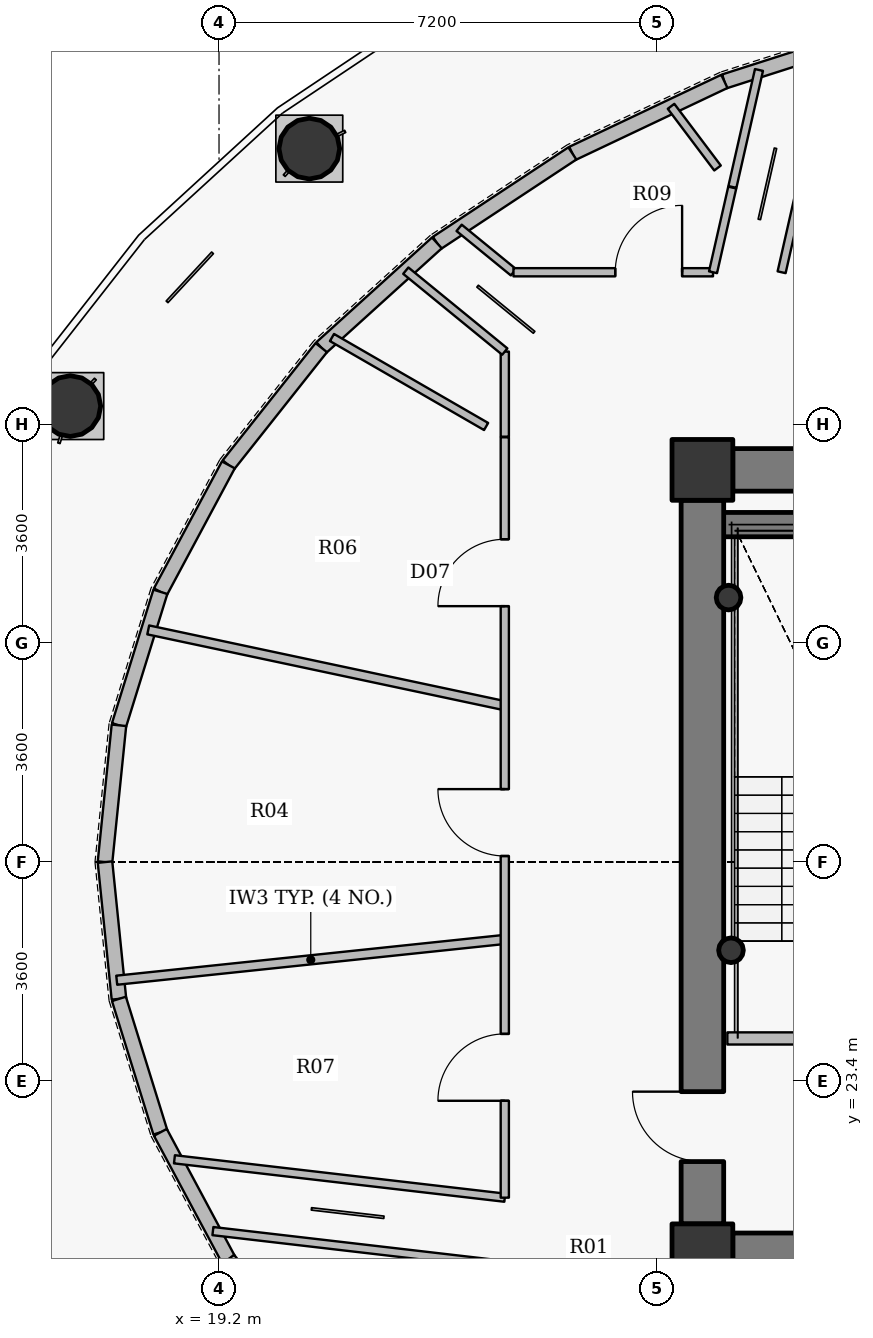
"""IFC4 building model, lengths in metres.
Left out: names, types, materials, properties, quantities, classifications, styles, units other than length and angle.
Written with IfcOpenShell. Run it as: python <this file> out.ifc"""

import sys

from ifc_helpers import new_model, si_unit, direction, frame, frame_2d, origin, origin_2d, place, context, subcontext, project, spatial, rectangle, hollow_circle, extrude, source, transform, mapped, element, fill, save


model = new_model("IFC4")
c1 = context("Model", 3, precision=1e-05, world=origin(), true_north=direction((0.0, 1.0)))
c2 = subcontext(c1, "Body", "Model", "MODEL_VIEW")
j1 = project(units=[si_unit("LENGTHUNIT", "METRE"), si_unit("PLANEANGLEUNIT", "RADIAN")], contexts=[c1])
p1 = place(None, origin())
s1 = spatial("IfcSite", under=j1, at=p1, CompositionType="ELEMENT")
p2 = place(p1, origin())
s2 = spatial("IfcBuilding", under=s1, at=p2, CompositionType="ELEMENT")
p3 = place(p2, frame((0.0, 0.0, 318.0)))
s3 = spatial("IfcBuildingStorey", under=s2, at=p3, CompositionType="ELEMENT", Elevation=318.0)
for number, where, z_axis, x_axis in (
    (1, (27.15, 20.55, 0.0), (0.0, 0.0, 1.0), (1.0, 0.0, 0.0)),
    (2, (27.15, 33.45, 0.0), (0.0, 0.0, 1.0), (1.0, 0.0, 0.0)),
):
    element("IfcColumn", number, at=place(p3, frame(where, z_axis=z_axis, x_axis=x_axis)), inside=s3, PredefinedType="COLUMN", context=c2, shape_type="SweptSolid", body=[
        extrude(rectangle(XDim=1.0, YDim=1.0, at=origin_2d()), origin(), (0.0, 0.0, 1.0), 6.0),
    ])
p4 = place(p3, frame((27.25, 32.55, 0.0), z_axis=(0.0, 0.0, 1.0), x_axis=(1.0, 0.0, 0.0)))
e3 = element("IfcWall", 3, at=p4, inside=s3, PredefinedType="SHEAR", context=c2, shape_type="SweptSolid", body=[
    extrude(rectangle(XDim=4.13, YDim=0.4, at=frame_2d((2.065, 0.0))), origin(), (0.0, 0.0, 1.0), 6.0),
])
for number, where, z_axis, x_axis in (
    (4, (27.58, 31.35, 0.0), (0.0, 0.0, 1.0), (1.0, 0.0, 0.0)),
    (5, (27.62, 25.55, 0.0), (0.0, 0.0, 1.0), (1.0, 0.0, 0.0)),
):
    element("IfcColumn", number, at=place(p3, frame(where, z_axis=z_axis, x_axis=x_axis)), inside=s3, PredefinedType="COLUMN", context=c2, shape_type="SweptSolid", body=[
        extrude(hollow_circle(Radius=0.203, WallThickness=0.016, at=origin_2d()), origin(), (0.0, 0.0, 1.0), 6.0),
    ])
p5 = place(p3, frame((27.65, 33.45, 0.0), z_axis=(0.0, 0.0, 1.0), x_axis=(1.0, 0.0, 0.0)))
e6 = element("IfcWall", 6, at=p5, inside=s3, PredefinedType="SHEAR", context=c2, shape_type="SweptSolid", body=[
    extrude(rectangle(XDim=16.7, YDim=0.7, at=frame_2d((8.35, 0.0))), origin(), (0.0, 0.0, 1.0), 5.3),
])
p6 = place(p5, frame((12.15, 0.0, 0.0)))
e7 = element("IfcOpeningElement", 7, at=p6, cuts=e6, PredefinedType="OPENING", context=c2, shape_type="SweptSolid", body=[
    extrude(rectangle(XDim=1.15, YDim=2.15, at=origin_2d()), frame((0.575, 0.36, 1.075), z_axis=(0.0, -1.0, 0.0), x_axis=(1.0, 0.0, 0.0)), (0.0, 0.0, 1.0), 0.72),
])
p7 = place(p3, frame((44.35, 20.55, 0.0), z_axis=(0.0, 0.0, 1.0), x_axis=(-1.0, 0.0, 0.0)))
e8 = element("IfcWall", 8, at=p7, inside=s3, PredefinedType="SHEAR", context=c2, shape_type="SweptSolid", body=[
    extrude(rectangle(XDim=16.7, YDim=0.7, at=frame_2d((8.35, 0.0))), origin(), (0.0, 0.0, 1.0), 5.3),
])
p8 = place(p7, frame((12.3, 0.0, 0.0)))
e9 = element("IfcOpeningElement", 9, at=p8, cuts=e8, PredefinedType="OPENING", context=c2, shape_type="SweptSolid", body=[
    extrude(rectangle(XDim=1.15, YDim=2.15, at=origin_2d()), frame((0.575, 0.36, 1.075), z_axis=(0.0, -1.0, 0.0), x_axis=(1.0, 0.0, 0.0)), (0.0, 0.0, 1.0), 0.72),
])
p9 = place(p3, frame((27.15, 21.05, 0.0), z_axis=(0.0, 0.0, 1.0), x_axis=(0.0, 1.0, 0.0)))
e10 = element("IfcWall", 10, at=p9, inside=s3, PredefinedType="SHEAR", context=c2, shape_type="SweptSolid", body=[
    extrude(rectangle(XDim=11.9, YDim=0.7, at=frame_2d((5.95, 0.0))), origin(), (0.0, 0.0, 1.0), 5.3),
])
p10 = place(p9, frame((1.025, 0.0, 0.0)))
e11 = element("IfcOpeningElement", 11, at=p10, cuts=e10, PredefinedType="OPENING", context=c2, shape_type="SweptSolid", body=[
    extrude(rectangle(XDim=1.15, YDim=2.15, at=origin_2d()), frame((0.575, 0.36, 1.075), z_axis=(0.0, -1.0, 0.0), x_axis=(1.0, 0.0, 0.0)), (0.0, 0.0, 1.0), 0.72),
])
for number, where, z_axis, x_axis in (
    (12, (20.685, 38.733, 0.0), (0.0, 0.0, 1.0), (1.0, 0.0, 0.0)),
    (13, (16.754, 34.5, 0.0), (0.0, 0.0, 1.0), (1.0, 0.0, 0.0)),
):
    element("IfcColumn", number, at=place(p3, frame(where, z_axis=z_axis, x_axis=x_axis)), inside=s3, PredefinedType="COLUMN", context=c2, shape_type="SweptSolid", body=[
        extrude(hollow_circle(Radius=0.5, WallThickness=0.032, at=origin_2d()), origin(), (0.0, 0.0, 1.0), 5.75),
    ])
p11 = place(p3, frame((27.511, 39.839, 0.0), z_axis=(0.0, 0.0, 1.0), x_axis=(0.952332464146, 0.305062088326, 0.0)))
e14 = element("IfcWall", 14, at=p11, inside=s3, PredefinedType="SOLIDWALL", context=c2, shape_type="SweptSolid", body=[
    extrude(rectangle(XDim=2.846, YDim=0.24, at=frame_2d((1.423, 0.0))), origin(), (0.0, 0.0, 1.0), 2.832),
])
p12 = place(p3, frame((25.011, 38.654, 0.0), z_axis=(0.0, 0.0, 1.0), x_axis=(0.903637179904, 0.428298782505, 0.0)))
e15 = element("IfcWall", 15, at=p12, inside=s3, PredefinedType="SOLIDWALL", context=c2, shape_type="SweptSolid", body=[
    extrude(rectangle(XDim=2.766, YDim=0.24, at=frame_2d((1.383, 0.0))), origin(), (0.0, 0.0, 1.0), 5.75),
])
p13 = place(p3, frame((22.783, 37.182, 0.0), z_axis=(0.0, 0.0, 1.0), x_axis=(0.834405901953, 0.551150424827, 0.0)))
e16 = element("IfcWall", 16, at=p13, inside=s3, PredefinedType="SOLIDWALL", context=c2, shape_type="SweptSolid", body=[
    extrude(rectangle(XDim=2.67, YDim=0.24, at=frame_2d((1.335, 0.0))), origin(), (0.0, 0.0, 1.0), 2.832),
])
p14 = place(p3, frame((20.882, 35.461, 0.0), z_axis=(0.0, 0.0, 1.0), x_axis=(0.741265131079, 0.671212340058, 0.0)))
e17 = element("IfcWall", 17, at=p14, inside=s3, PredefinedType="SOLIDWALL", context=c2, shape_type="SweptSolid", body=[
    extrude(rectangle(XDim=2.565, YDim=0.24, at=frame_2d((1.282, 0.0))), origin(), (0.0, 0.0, 1.0), 2.832),
])
p15 = place(p3, frame((19.354, 33.532, 0.0), z_axis=(0.0, 0.0, 1.0), x_axis=(0.621045987707, 0.783774126361, 0.0)))
e18 = element("IfcWall", 18, at=p15, inside=s3, PredefinedType="SOLIDWALL", context=c2, shape_type="SweptSolid", body=[
    extrude(rectangle(XDim=2.46, YDim=0.24, at=frame_2d((1.23, 0.0))), origin(), (0.0, 0.0, 1.0), 4.235),
])
p16 = place(p3, frame((18.235, 31.445, 0.0), z_axis=(0.0, 0.0, 1.0), x_axis=(0.472149891985, 0.881518280865, 0.0)))
e19 = element("IfcWall", 19, at=p16, inside=s3, PredefinedType="SOLIDWALL", context=c2, shape_type="SweptSolid", body=[
    extrude(rectangle(XDim=2.368, YDim=0.24, at=frame_2d((1.184, 0.0))), origin(), (0.0, 0.0, 1.0), 4.235),
])
p17 = place(p3, frame((17.554, 29.25, 0.0), z_axis=(0.0, 0.0, 1.0), x_axis=(0.296466035026, 0.95504339696, 0.0)))
e20 = element("IfcWall", 20, at=p17, inside=s3, PredefinedType="SOLIDWALL", context=c2, shape_type="SweptSolid", body=[
    extrude(rectangle(XDim=2.298, YDim=0.24, at=frame_2d((1.149, 0.0))), origin(), (0.0, 0.0, 1.0), 5.75),
])
for number, where, z_axis, x_axis in (
    (21, (17.325, 27.0, 0.0), (0.0, 0.0, 1.0), (0.101, 0.995, 0.0)),
    (22, (17.554, 24.75, 0.0), (0.0, 0.0, 1.0), (-0.101, 0.995, 0.0)),
):
    element("IfcWall", number, at=place(p3, frame(where, z_axis=z_axis, x_axis=x_axis)), inside=s3, PredefinedType="SOLIDWALL", context=c2, shape_type="SweptSolid", body=[
        extrude(rectangle(XDim=2.261, YDim=0.24, at=frame_2d((1.131, 0.0))), origin(), (0.0, 0.0, 1.0), 4.235),
    ])
p18 = place(p3, frame((18.235, 22.555, 0.0), z_axis=(0.0, 0.0, 1.0), x_axis=(-0.296466035026, 0.95504339696, 0.0)))
e23 = element("IfcWall", 23, at=p18, inside=s3, PredefinedType="SOLIDWALL", context=c2, shape_type="SweptSolid", body=[
    extrude(rectangle(XDim=2.298, YDim=0.24, at=frame_2d((1.149, 0.0))), origin(), (0.0, 0.0, 1.0), 4.235),
])
p19 = place(p3, frame((19.354, 20.468, 0.0), z_axis=(0.0, 0.0, 1.0), x_axis=(-0.472149891985, 0.881518280865, 0.0)))
e24 = element("IfcWall", 24, at=p19, inside=s3, PredefinedType="SOLIDWALL", context=c2, shape_type="SweptSolid", body=[
    extrude(rectangle(XDim=2.368, YDim=0.24, at=frame_2d((1.184, 0.0))), origin(), (0.0, 0.0, 1.0), 2.832),
])
p20 = place(p3, frame((20.882, 18.539, 0.0), z_axis=(0.0, 0.0, 1.0), x_axis=(-0.621045987707, 0.783774126361, 0.0)))
e25 = element("IfcWall", 25, at=p20, inside=s3, PredefinedType="SOLIDWALL", context=c2, shape_type="SweptSolid", body=[
    extrude(rectangle(XDim=2.46, YDim=0.24, at=frame_2d((1.23, 0.0))), origin(), (0.0, 0.0, 1.0), 5.75),
])
p21 = place(p3, frame((17.518, 25.057, 0.0), z_axis=(0.0, 0.0, 1.0), x_axis=(0.994520451451, 0.104542200313, 0.0)))
e26 = element("IfcWall", 26, at=p21, inside=s3, PredefinedType="PARTITIONING", context=c2, shape_type="SweptSolid", body=[
    extrude(rectangle(XDim=6.417, YDim=0.15, at=frame_2d((3.209, 0.0))), origin(), (0.0, 0.0, 1.0), 5.335),
])
p22 = place(p3, frame((18.036, 30.818, 0.0), z_axis=(0.0, 0.0, 1.0), x_axis=(0.978152640753, -0.207887977979, 0.0)))
e27 = element("IfcWall", 27, at=p22, inside=s3, PredefinedType="PARTITIONING", context=c2, shape_type="SweptSolid", body=[
    extrude(rectangle(XDim=5.995, YDim=0.15, at=frame_2d((2.998, 0.0))), origin(), (0.0, 0.0, 1.0), 5.75),
])
p23 = place(p3, frame((18.467, 22.113, 0.0), z_axis=(0.0, 0.0, 1.0), x_axis=(0.993315952132, -0.115427116573, 0.0)))
e28 = element("IfcWall", 28, at=p23, inside=s3, PredefinedType="PARTITIONING", context=c2, shape_type="SweptSolid", body=[
    extrude(rectangle(XDim=5.47, YDim=0.135, at=frame_2d((2.735, 0.0))), origin(), (0.0, 0.0, 1.0), 5.75),
])
p24 = place(p3, frame((23.149, 37.43, 0.0), z_axis=(0.0, 0.0, 1.0), x_axis=(0.774324787676, -0.632788371568, 0.0)))
e29 = element("IfcWall", 29, at=p24, inside=s3, PredefinedType="PARTITIONING", context=c2, shape_type="SweptSolid", body=[
    extrude(rectangle(XDim=1.154, YDim=0.135, at=frame_2d((0.577, 0.0))), origin(), (0.0, 0.0, 1.0), 5.75),
])
p25 = place(p3, frame((23.9, 21.481, 0.0), z_axis=(0.0, 0.0, 1.0), x_axis=(0.0, 1.0, 0.0)))
e30 = element("IfcWall", 30, at=p25, inside=s3, PredefinedType="PARTITIONING", context=c2, shape_type="SweptSolid", body=[
    extrude(rectangle(XDim=12.505, YDim=0.135, at=frame_2d((6.252, 0.0))), origin(), (0.0, 0.0, 1.0), 4.235),
])
p26 = place(p25, frame((9.728, 0.0, 0.0)))
e31 = element("IfcOpeningElement", 31, at=p26, cuts=e30, PredefinedType="OPENING", context=c2, shape_type="SweptSolid", body=[
    extrude(rectangle(XDim=1.1, YDim=2.15, at=origin_2d()), frame((0.55, 0.078, 1.075), z_axis=(0.0, -1.0, 0.0), x_axis=(1.0, 0.0, 0.0)), (0.0, 0.0, 1.0), 0.155),
])
p27 = place(p25, frame((5.619, 0.0, 0.0)))
e32 = element("IfcOpeningElement", 32, at=p27, cuts=e30, PredefinedType="OPENING", context=c2, shape_type="SweptSolid", body=[
    extrude(rectangle(XDim=1.1, YDim=2.15, at=origin_2d()), frame((0.55, 0.078, 1.075), z_axis=(0.0, -1.0, 0.0), x_axis=(1.0, 0.0, 0.0)), (0.0, 0.0, 1.0), 0.155),
])
p28 = place(p25, frame((1.594, 0.0, 0.0)))
e33 = element("IfcOpeningElement", 33, at=p28, cuts=e30, PredefinedType="OPENING", context=c2, shape_type="SweptSolid", body=[
    extrude(rectangle(XDim=1.1, YDim=2.15, at=origin_2d()), frame((0.55, 0.078, 1.075), z_axis=(0.0, -1.0, 0.0), x_axis=(1.0, 0.0, 0.0)), (0.0, 0.0, 1.0), 0.155),
])
p29 = place(p3, frame((24.042, 36.7, 0.0), z_axis=(0.0, 0.0, 1.0), x_axis=(1.0, 0.0, 0.0)))
e34 = element("IfcWall", 34, at=p29, inside=s3, PredefinedType="PARTITIONING", context=c2, shape_type="SweptSolid", body=[
    extrude(rectangle(XDim=3.282, YDim=0.135, at=frame_2d((1.641, 0.0))), origin(), (0.0, 0.0, 1.0), 5.75),
])
p30 = place(p29, frame((1.674, 0.0, 0.0)))
e35 = element("IfcOpeningElement", 35, at=p30, cuts=e34, PredefinedType="OPENING", context=c2, shape_type="SweptSolid", body=[
    extrude(rectangle(XDim=1.1, YDim=2.15, at=origin_2d()), frame((0.55, 0.078, 1.075), z_axis=(0.0, -1.0, 0.0), x_axis=(1.0, 0.0, 0.0)), (0.0, 0.0, 1.0), 0.155),
])
p31 = place(p3, frame((27.324, 36.7, 0.0), z_axis=(0.0, 0.0, 1.0), x_axis=(0.221525059427, 0.975154679036, 0.0)))
e36 = element("IfcWall", 36, at=p31, inside=s3, PredefinedType="PARTITIONING", context=c2, shape_type="SweptSolid", body=[
    extrude(rectangle(XDim=1.428, YDim=0.135, at=frame_2d((0.714, 0.0))), origin(), (0.0, 0.0, 1.0), 5.75),
])
p32 = place(p3, frame((27.56, 24.1, 0.0), z_axis=(0.0, 0.0, 1.0), x_axis=(1.0, 0.0, 0.0)))
e37 = element("IfcWall", 37, at=p32, inside=s3, PredefinedType="PARTITIONING", context=c2, shape_type="SweptSolid", body=[
    extrude(rectangle(XDim=3.54, YDim=0.2, at=frame_2d((1.77, 0.0))), origin(), (0.0, 0.0, 1.0), 5.75),
])
p33 = place(p32, frame((1.17, 0.0, 0.0)))
e38 = element("IfcOpeningElement", 38, at=p33, cuts=e37, PredefinedType="OPENING", context=c2, shape_type="SweptSolid", body=[
    extrude(rectangle(XDim=1.2, YDim=2.15, at=origin_2d()), frame((0.6, 0.11, 1.075), z_axis=(0.0, -1.0, 0.0), x_axis=(1.0, 0.0, 0.0)), (0.0, 0.0, 1.0), 0.22),
])
p34 = place(p3, frame((23.9, 20.374, 0.0), z_axis=(0.0, 0.0, 1.0), x_axis=(-0.993315464897, 0.115431309428, 0.0)))
e39 = element("IfcWall", 39, at=p34, inside=s3, PredefinedType="PARTITIONING", context=c2, shape_type="SweptSolid", body=[
    extrude(rectangle(XDim=4.833, YDim=0.135, at=frame_2d((2.417, 0.0))), origin(), (0.0, 0.0, 1.0), 5.75),
])
p35 = place(p3, frame((23.9, 33.996, 0.0), z_axis=(0.0, 0.0, 1.0), x_axis=(0.0, 1.0, 0.0)))
e40 = element("IfcWall", 40, at=p35, inside=s3, PredefinedType="PARTITIONING", context=c2, shape_type="SweptSolid", body=[
    extrude(rectangle(XDim=1.4, YDim=0.135, at=frame_2d((0.7, 0.0))), origin(), (0.0, 0.0, 1.0), 5.75),
])
p36 = place(p3, frame((23.9, 35.396, 0.0), z_axis=(0.0, 0.0, 1.0), x_axis=(-0.774324461251, 0.632788771003, 0.0)))
e41 = element("IfcWall", 41, at=p36, inside=s3, PredefinedType="PARTITIONING", context=c2, shape_type="SweptSolid", body=[
    extrude(rectangle(XDim=2.103, YDim=0.135, at=frame_2d((1.051, 0.0))), origin(), (0.0, 0.0, 1.0), 5.335),
])
p37 = place(p3, frame((27.643, 38.103, 0.0), z_axis=(0.0, 0.0, 1.0), x_axis=(0.221605059648, 0.975136502003, 0.0)))
e42 = element("IfcWall", 42, at=p37, inside=s3, PredefinedType="PARTITIONING", context=c2, shape_type="SweptSolid", body=[
    extrude(rectangle(XDim=1.973, YDim=0.135, at=frame_2d((0.987, 0.0))), origin(), (0.0, 0.0, 1.0), 5.75),
])
p38 = place(p3, frame((28.742, 37.976, 0.0), z_axis=(0.0, 0.0, 1.0), x_axis=(-0.221588855945, -0.975140184241, 0.0)))
e43 = element("IfcWall", 43, at=p38, inside=s3, PredefinedType="PARTITIONING", context=c2, shape_type="SweptSolid", body=[
    extrude(rectangle(XDim=1.309, YDim=0.135, at=frame_2d((0.654, 0.0))), origin(), (0.0, 0.0, 1.0), 5.75),
])
p39 = place(p3, frame((27.64, 33.8, 0.0), z_axis=(0.0, 0.0, 1.0), x_axis=(-1.0, 0.0, 0.0)))
e44 = element("IfcWall", 44, at=p39, inside=s3, PredefinedType="PARTITIONING", context=c2, shape_type="SweptSolid", body=[
    extrude(rectangle(XDim=0.84, YDim=0.135, at=frame_2d((0.42, 0.0))), origin(), (0.0, 0.0, 1.0), 2.832),
])
p40 = place(p3, frame((26.8, 33.492, 0.0), z_axis=(0.0, 0.0, 1.0), x_axis=(0.0, -1.0, 0.0)))
e45 = element("IfcWall", 45, at=p40, inside=s3, PredefinedType="PARTITIONING", context=c2, shape_type="SweptSolid", body=[
    extrude(rectangle(XDim=0.532, YDim=0.135, at=frame_2d((0.266, 0.0))), origin(), (0.0, 0.0, 1.0), 5.75),
])
p41 = place(p3, frame((26.8, 21.04, 0.0), z_axis=(0.0, 0.0, 1.0), x_axis=(0.0, -1.0, 0.0)))
e46 = element("IfcWall", 46, at=p41, inside=s3, PredefinedType="PARTITIONING", context=c2, shape_type="SweptSolid", body=[
    extrude(rectangle(XDim=0.84, YDim=0.135, at=frame_2d((0.42, 0.0))), origin(), (0.0, 0.0, 1.0), 2.832),
])
p42 = place(p3, frame((26.634, 39.429, 0.0), z_axis=(0.0, 0.0, 1.0), x_axis=(0.601843134743, -0.798614325668, 0.0)))
e47 = element("IfcWall", 47, at=p42, inside=s3, PredefinedType="PARTITIONING", context=c2, shape_type="SweptSolid", body=[
    extrude(rectangle(XDim=1.271, YDim=0.135, at=frame_2d((0.635, 0.0))), origin(), (0.0, 0.0, 1.0), 5.75),
])
p43 = place(p3, frame((21.058, 35.627, 0.0), z_axis=(0.0, 0.0, 1.0), x_axis=(0.866048079195, -0.49996072298, 0.0)))
e48 = element("IfcWall", 48, at=p43, inside=s3, PredefinedType="PARTITIONING", context=c2, shape_type="SweptSolid", body=[
    extrude(rectangle(XDim=2.927, YDim=0.135, at=frame_2d((1.463, 0.0))), origin(), (0.0, 0.0, 1.0), 5.335),
])
m1 = source(origin(), c2, "Body", "SweptSolid", [
    extrude(rectangle(XDim=1.15, YDim=2.15, at=origin_2d()), frame((0.575, 0.025, 1.075), z_axis=(0.0, -1.0, 0.0), x_axis=(1.0, 0.0, 0.0)), (0.0, 0.0, 1.0), 0.05),
])
p44 = place(p10, origin())
e49 = element("IfcDoor", 49, at=p44, inside=s3, OperationType="SINGLE_SWING_RIGHT", PredefinedType="DOOR", context=c2, shape_type="MappedRepresentation", body=[
    mapped(m1, transform((0.0, 0.0, 0.0), x_axis=(1.0, 0.0, 0.0), y_axis=(0.0, 1.0, 0.0), z_axis=(0.0, 0.0, 1.0), scale=1.0)),
])
fill(e11, e49)
m2 = source(origin(), c2, "Body", "SweptSolid", [
    extrude(rectangle(XDim=1.1, YDim=2.15, at=origin_2d()), frame((0.55, 0.025, 1.075), z_axis=(0.0, -1.0, 0.0), x_axis=(1.0, 0.0, 0.0)), (0.0, 0.0, 1.0), 0.05),
])
p45 = place(p30, origin())
e50 = element("IfcDoor", 50, at=p45, inside=s3, OperationType="SINGLE_SWING_RIGHT", PredefinedType="DOOR", context=c2, shape_type="MappedRepresentation", body=[
    mapped(m2, transform((0.0, 0.0, 0.0), x_axis=(1.0, 0.0, 0.0), y_axis=(0.0, 1.0, 0.0), z_axis=(0.0, 0.0, 1.0), scale=1.0)),
])
fill(e35, e50)
p46 = place(p26, origin())
e51 = element("IfcDoor", 51, at=p46, inside=s3, OperationType="SINGLE_SWING_LEFT", PredefinedType="DOOR", context=c2, shape_type="MappedRepresentation", body=[
    mapped(m2, transform((0.0, 0.0, 0.0), x_axis=(1.0, 0.0, 0.0), y_axis=(0.0, 1.0, 0.0), z_axis=(0.0, 0.0, 1.0), scale=1.0)),
])
fill(e31, e51)
p47 = place(p27, origin())
e52 = element("IfcDoor", 52, at=p47, inside=s3, OperationType="SINGLE_SWING_RIGHT", PredefinedType="DOOR", context=c2, shape_type="MappedRepresentation", body=[
    mapped(m2, transform((0.0, 0.0, 0.0), x_axis=(1.0, 0.0, 0.0), y_axis=(0.0, 1.0, 0.0), z_axis=(0.0, 0.0, 1.0), scale=1.0)),
])
fill(e32, e52)
p48 = place(p28, origin())
e53 = element("IfcDoor", 53, at=p48, inside=s3, OperationType="SINGLE_SWING_LEFT", PredefinedType="DOOR", context=c2, shape_type="MappedRepresentation", body=[
    mapped(m2, transform((0.0, 0.0, 0.0), x_axis=(1.0, 0.0, 0.0), y_axis=(0.0, 1.0, 0.0), z_axis=(0.0, 0.0, 1.0), scale=1.0)),
])
fill(e33, e53)
save(model, sys.argv[1])
